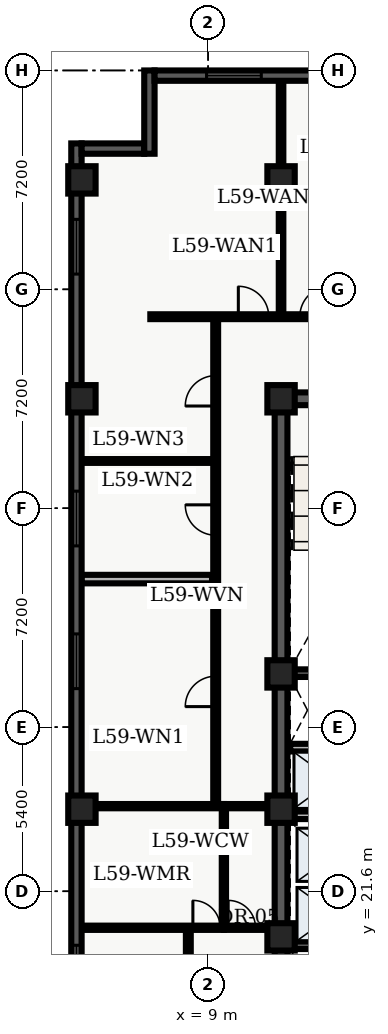
"""IFC4 building model, lengths in metres.
Left out: names, types, materials, properties, quantities, classifications, styles, units other than length and angle.
Written with IfcOpenShell. Run it as: python <this file> out.ifc"""

import sys

from ifc_helpers import new_model, entity, si_unit, converted_unit, direction, frame, origin_with_axes, origin_2d_with_axis, place, context, subcontext, project, spatial, polyline, rectangle, outline, extrude, element, fill, save


model = new_model("IFC4")
c1 = context("Model", 3, precision=1e-05, world=origin_with_axes(), true_north=direction((0.0, 1.0)))
c2 = subcontext(c1, "Body", "Model", "MODEL_VIEW")
j1 = project(units=[si_unit("LENGTHUNIT", "METRE"), converted_unit("PLANEANGLEUNIT", "DEGREE", entity("IfcPlaneAngleMeasure", 0.017), si_unit("PLANEANGLEUNIT", "RADIAN"), dimensions=[0, 0, 0, 0, 0, 0, 0])], contexts=[c1])
p1 = place(None, origin_with_axes())
s1 = spatial("IfcSite", under=j1, at=p1, CompositionType="ELEMENT")
p2 = place(p1, origin_with_axes())
s2 = spatial("IfcBuilding", under=s1, at=p2, CompositionType="ELEMENT")
p3 = place(p2, frame((0.0, 0.0, 240.3), z_axis=(0.0, 0.0, 1.0), x_axis=(1.0, 0.0, 0.0)))
s3 = spatial("IfcBuildingStorey", under=s2, at=p3, CompositionType="ELEMENT", Elevation=240.3)
p4 = place(p3, frame((11.4, 10.8, 0.0), z_axis=(0.0, 0.0, 1.0), x_axis=(0.0, 1.0, 0.0)))
e1 = element("IfcWall", 1, at=p4, inside=s3, PredefinedType="SHEAR", context=c2, shape_type="SweptSolid", body=[
    extrude(outline(polyline([(0.0, -0.21), (27.0, -0.21), (27.0, 0.21), (0.0, 0.21), (0.0, -0.21)])), origin_with_axes(), (0.0, 0.0, 1.0), 3.66),
])
p5 = place(p3, frame((11.4, 37.8, 0.0), z_axis=(0.0, 0.0, 1.0), x_axis=(1.0, 0.0, 0.0)))
e2 = element("IfcWall", 2, at=p5, inside=s3, PredefinedType="SHEAR", context=c2, shape_type="SweptSolid", body=[
    extrude(outline(polyline([(0.0, -0.21), (7.2, -0.21), (7.2, 0.21), (0.0, 0.21), (0.0, -0.21)])), origin_with_axes(), (0.0, 0.0, 1.0), 3.66),
])
p6 = place(p5, frame((2.625, 0.0, 0.0), z_axis=(0.0, 0.0, 1.0), x_axis=(1.0, 0.0, 0.0)))
e3 = element("IfcOpeningElement", 3, at=p6, cuts=e2, PredefinedType="OPENING", context=c2, shape_type="SweptSolid", body=[
    extrude(rectangle(XDim=1.05, YDim=0.44, at=origin_2d_with_axis()), origin_with_axes(), (0.0, 0.0, 1.0), 2.15),
])
for number, where, z_axis, x_axis in (
    (4, (11.61, 19.825, 0.0), (0.0, 0.0, 1.0), (1.0, 0.0, 0.0)),
    (5, (11.61, 28.775, 0.0), (0.0, 0.0, 1.0), (1.0, 0.0, 0.0)),
):
    element("IfcWall", number, at=place(p3, frame(where, z_axis=z_axis, x_axis=x_axis)), inside=s3, PredefinedType="SHEAR", context=c2, shape_type="SweptSolid", body=[
        extrude(outline(polyline([(0.0, -0.125), (6.78, -0.125), (6.78, 0.125), (0.0, 0.125), (0.0, -0.125)])), origin_with_axes(), (0.0, 0.0, 1.0), 3.66),
    ])
p7 = place(p3, frame((11.7, 24.1, 0.0), z_axis=(0.0, 0.0, 1.0), x_axis=(1.0, 0.0, 0.0)))
e6 = element("IfcWall", 6, at=p7, inside=s3, PredefinedType="SOLIDWALL", context=c2, shape_type="SweptSolid", body=[
    extrude(outline(polyline([(0.0, -0.125), (6.6, -0.125), (6.6, 0.125), (0.0, 0.125), (0.0, -0.125)])), origin_with_axes(), (0.0, 0.0, 1.0), 2.7),
])
p8 = place(p7, frame((3.6, 0.0, 0.0), z_axis=(0.0, 0.0, 1.0), x_axis=(1.0, 0.0, 0.0)))
e7 = element("IfcOpeningElement", 7, at=p8, cuts=e6, PredefinedType="OPENING", context=c2, shape_type="SweptSolid", body=[
    extrude(rectangle(XDim=0.9, YDim=0.27, at=origin_2d_with_axis()), origin_with_axes(), (0.0, 0.0, 1.0), 2.15),
])
p9 = place(p7, frame((5.65, 0.0, 0.0), z_axis=(0.0, 0.0, 1.0), x_axis=(1.0, 0.0, 0.0)))
e8 = element("IfcOpeningElement", 8, at=p9, cuts=e6, PredefinedType="OPENING", context=c2, shape_type="SweptSolid", body=[
    extrude(rectangle(XDim=0.9, YDim=0.27, at=origin_2d_with_axis()), origin_with_axes(), (0.0, 0.0, 1.0), 2.15),
])
p10 = place(p3, frame((11.7, 26.325, 0.0), z_axis=(0.0, 0.0, 1.0), x_axis=(1.0, 0.0, 0.0)))
e9 = element("IfcWall", 9, at=p10, inside=s3, PredefinedType="SOLIDWALL", context=c2, shape_type="SweptSolid", body=[
    extrude(outline(polyline([(0.0, -0.125), (6.6, -0.125), (6.6, 0.125), (0.0, 0.125), (0.0, -0.125)])), origin_with_axes(), (0.0, 0.0, 1.0), 2.7),
])
p11 = place(p10, frame((3.5, 0.0, 0.0), z_axis=(0.0, 0.0, 1.0), x_axis=(1.0, 0.0, 0.0)))
e10 = element("IfcOpeningElement", 10, at=p11, cuts=e9, PredefinedType="OPENING", context=c2, shape_type="SweptSolid", body=[
    extrude(rectangle(XDim=0.9, YDim=0.27, at=origin_2d_with_axis()), origin_with_axes(), (0.0, 0.0, 1.0), 2.15),
])
for number, where, z_axis, x_axis in (
    (11, (11.4, 20.1, 0.0), (0.0, 0.0, 1.0), (1.0, 0.0, 0.0)),
    (12, (11.4, 24.3, 0.0), (0.0, 0.0, 1.0), (1.0, 0.0, 0.0)),
    (13, (11.4, 28.75, 0.0), (0.0, 0.0, 1.0), (1.0, 0.0, 0.0)),
    (14, (11.4, 37.8, 0.0), (0.0, 0.0, 1.0), (1.0, 0.0, 0.0)),
    (15, (11.4, 45.0, 0.0), (0.0, 0.0, 1.0), (1.0, 0.0, 0.0)),
    (16, (4.85, 24.3, 0.0), (0.0, 0.0, 1.0), (1.0, 0.0, 0.0)),
    (17, (4.85, 37.8, 0.0), (0.0, 0.0, 1.0), (1.0, 0.0, 0.0)),
    (18, (4.85, 45.0, 0.0), (0.0, 0.0, 1.0), (1.0, 0.0, 0.0)),
):
    element("IfcColumn", number, at=place(p3, frame(where, z_axis=z_axis, x_axis=x_axis)), inside=s3, PredefinedType="COLUMN", context=c2, shape_type="SweptSolid", body=[
        extrude(rectangle(XDim=0.9, YDim=0.9, at=origin_2d_with_axis()), origin_with_axes(), (0.0, 0.0, 1.0), 3.9),
    ])
p12 = place(p3, frame((9.52, 20.4, 0.0), z_axis=(0.0, 0.0, 1.0), x_axis=(0.0, 1.0, 0.0)))
e19 = element("IfcWall", 19, at=p12, inside=s3, PredefinedType="PARTITIONING", context=c2, shape_type="SweptSolid", body=[
    extrude(outline(polyline([(0.0, -0.07), (4.0, -0.07), (4.0, 0.07), (0.0, 0.07), (0.0, -0.07)])), origin_with_axes(), (0.0, 0.0, 1.0), 2.7),
])
p13 = place(p3, frame((9.52, 20.4, 0.0), z_axis=(0.0, 0.0, 1.0), x_axis=(1.0, 0.0, 0.0)))
e20 = element("IfcWall", 20, at=p13, inside=s3, PredefinedType="PARTITIONING", context=c2, shape_type="SweptSolid", body=[
    extrude(outline(polyline([(0.0, -0.07), (1.58, -0.07), (1.58, 0.07), (0.0, 0.07), (0.0, -0.07)])), origin_with_axes(), (0.0, 0.0, 1.0), 2.7),
])
p14 = place(p13, frame((0.59, 0.0, 0.0), z_axis=(0.0, 0.0, 1.0), x_axis=(1.0, 0.0, 0.0)))
e21 = element("IfcOpeningElement", 21, at=p14, cuts=e20, PredefinedType="OPENING", context=c2, shape_type="SweptSolid", body=[
    extrude(rectangle(XDim=0.9, YDim=0.16, at=origin_2d_with_axis()), origin_with_axes(), (0.0, 0.0, 1.0), 2.15),
])
p15 = place(p3, frame((9.52, 24.4, 0.0), z_axis=(0.0, 0.0, 1.0), x_axis=(1.0, 0.0, 0.0)))
e22 = element("IfcWall", 22, at=p15, inside=s3, PredefinedType="PARTITIONING", context=c2, shape_type="SweptSolid", body=[
    extrude(outline(polyline([(0.0, -0.07), (1.58, -0.07), (1.58, 0.07), (0.0, 0.07), (0.0, -0.07)])), origin_with_axes(), (0.0, 0.0, 1.0), 2.7),
])
p16 = place(p3, frame((7.1, 40.5, 0.0), z_axis=(0.0, 0.0, 1.0), x_axis=(1.0, 0.0, 0.0)))
e23 = element("IfcWall", 23, at=p16, inside=s3, PredefinedType="PARTITIONING", context=c2, shape_type="SweptSolid", body=[
    extrude(outline(polyline([(0.0, -0.08), (24.965, -0.08), (24.965, 0.08), (0.0, 0.08), (0.0, -0.08)])), origin_with_axes(), (0.0, 0.0, 1.0), 2.7),
])
p17 = place(p16, frame((3.395, 0.0, 0.0), z_axis=(0.0, 0.0, 1.0), x_axis=(1.0, 0.0, 0.0)))
e24 = element("IfcOpeningElement", 24, at=p17, cuts=e23, PredefinedType="OPENING", context=c2, shape_type="SweptSolid", body=[
    extrude(rectangle(XDim=1.0, YDim=0.18, at=origin_2d_with_axis()), origin_with_axes(), (0.0, 0.0, 1.0), 2.15),
])
p18 = place(p16, frame((5.418, 0.0, 0.0), z_axis=(0.0, 0.0, 1.0), x_axis=(1.0, 0.0, 0.0)))
e25 = element("IfcOpeningElement", 25, at=p18, cuts=e23, PredefinedType="OPENING", context=c2, shape_type="SweptSolid", body=[
    extrude(rectangle(XDim=1.0, YDim=0.18, at=origin_2d_with_axis()), origin_with_axes(), (0.0, 0.0, 1.0), 2.15),
])
p19 = place(p16, frame((8.386, 0.0, 0.0), z_axis=(0.0, 0.0, 1.0), x_axis=(1.0, 0.0, 0.0)))
e26 = element("IfcOpeningElement", 26, at=p19, cuts=e23, PredefinedType="OPENING", context=c2, shape_type="SweptSolid", body=[
    extrude(rectangle(XDim=1.0, YDim=0.18, at=origin_2d_with_axis()), origin_with_axes(), (0.0, 0.0, 1.0), 2.15),
])
p20 = place(p16, frame((11.068, 0.0, 0.0), z_axis=(0.0, 0.0, 1.0), x_axis=(1.0, 0.0, 0.0)))
e27 = element("IfcOpeningElement", 27, at=p20, cuts=e23, PredefinedType="OPENING", context=c2, shape_type="SweptSolid", body=[
    extrude(rectangle(XDim=1.0, YDim=0.18, at=origin_2d_with_axis()), origin_with_axes(), (0.0, 0.0, 1.0), 2.15),
])
p21 = place(p3, frame((8.35, 7.8, 0.0), z_axis=(0.0, 0.0, 1.0), x_axis=(0.0, 1.0, 0.0)))
e28 = element("IfcWall", 28, at=p21, inside=s3, PredefinedType="PARTITIONING", context=c2, shape_type="SweptSolid", body=[
    extrude(outline(polyline([(0.0, -0.08), (12.6, -0.08), (12.6, 0.08), (0.0, 0.08), (0.0, -0.08)])), origin_with_axes(), (0.0, 0.0, 1.0), 2.7),
])
p22 = place(p21, frame((2.932, 0.0, 0.0), z_axis=(0.0, 0.0, 1.0), x_axis=(1.0, 0.0, 0.0)))
e29 = element("IfcOpeningElement", 29, at=p22, cuts=e28, PredefinedType="OPENING", context=c2, shape_type="SweptSolid", body=[
    extrude(rectangle(XDim=1.0, YDim=0.18, at=origin_2d_with_axis()), origin_with_axes(), (0.0, 0.0, 1.0), 2.15),
])
p23 = place(p21, frame((9.127, 0.0, 0.0), z_axis=(0.0, 0.0, 1.0), x_axis=(1.0, 0.0, 0.0)))
e30 = element("IfcOpeningElement", 30, at=p23, cuts=e28, PredefinedType="OPENING", context=c2, shape_type="SweptSolid", body=[
    extrude(rectangle(XDim=1.0, YDim=0.18, at=origin_2d_with_axis()), origin_with_axes(), (0.0, 0.0, 1.0), 2.15),
])
p24 = place(p3, frame((9.25, 24.4, 0.0), z_axis=(0.0, 0.0, 1.0), x_axis=(0.0, 1.0, 0.0)))
e31 = element("IfcWall", 31, at=p24, inside=s3, PredefinedType="PARTITIONING", context=c2, shape_type="SweptSolid", body=[
    extrude(outline(polyline([(0.0, -0.08), (16.1, -0.08), (16.1, 0.08), (0.0, 0.08), (0.0, -0.08)])), origin_with_axes(), (0.0, 0.0, 1.0), 2.7),
])
p25 = place(p24, frame((3.775, 0.0, 0.0), z_axis=(0.0, 0.0, 1.0), x_axis=(1.0, 0.0, 0.0)))
e32 = element("IfcOpeningElement", 32, at=p25, cuts=e31, PredefinedType="OPENING", context=c2, shape_type="SweptSolid", body=[
    extrude(rectangle(XDim=1.0, YDim=0.18, at=origin_2d_with_axis()), origin_with_axes(), (0.0, 0.0, 1.0), 2.15),
])
p26 = place(p24, frame((9.412, 0.0, 0.0), z_axis=(0.0, 0.0, 1.0), x_axis=(1.0, 0.0, 0.0)))
e33 = element("IfcOpeningElement", 33, at=p26, cuts=e31, PredefinedType="OPENING", context=c2, shape_type="SweptSolid", body=[
    extrude(rectangle(XDim=1.0, YDim=0.18, at=origin_2d_with_axis()), origin_with_axes(), (0.0, 0.0, 1.0), 2.15),
])
p27 = place(p24, frame((13.662, 0.0, 0.0), z_axis=(0.0, 0.0, 1.0), x_axis=(1.0, 0.0, 0.0)))
e34 = element("IfcOpeningElement", 34, at=p27, cuts=e31, PredefinedType="OPENING", context=c2, shape_type="SweptSolid", body=[
    extrude(rectangle(XDim=1.0, YDim=0.18, at=origin_2d_with_axis()), origin_with_axes(), (0.0, 0.0, 1.0), 2.15),
])
p28 = place(p3, frame((4.835, 20.4, 0.0), z_axis=(0.0, 0.0, 1.0), x_axis=(1.0, 0.0, 0.0)))
e35 = element("IfcWall", 35, at=p28, inside=s3, PredefinedType="PARTITIONING", context=c2, shape_type="SweptSolid", body=[
    extrude(outline(polyline([(0.0, -0.07), (4.685, -0.07), (4.685, 0.07), (0.0, 0.07), (0.0, -0.07)])), origin_with_axes(), (0.0, 0.0, 1.0), 2.7),
])
p29 = place(p28, frame((4.115, 0.0, 0.0), z_axis=(0.0, 0.0, 1.0), x_axis=(1.0, 0.0, 0.0)))
e36 = element("IfcOpeningElement", 36, at=p29, cuts=e35, PredefinedType="OPENING", context=c2, shape_type="SweptSolid", body=[
    extrude(rectangle(XDim=0.9, YDim=0.16, at=origin_2d_with_axis()), origin_with_axes(), (0.0, 0.0, 1.0), 2.15),
])
p30 = place(p3, frame((4.835, 24.4, 0.0), z_axis=(0.0, 0.0, 1.0), x_axis=(1.0, 0.0, 0.0)))
e37 = element("IfcWall", 37, at=p30, inside=s3, PredefinedType="PARTITIONING", context=c2, shape_type="SweptSolid", body=[
    extrude(outline(polyline([(0.0, -0.07), (4.685, -0.07), (4.685, 0.07), (0.0, 0.07), (0.0, -0.07)])), origin_with_axes(), (0.0, 0.0, 1.0), 2.7),
])
p31 = place(p3, frame((4.835, 31.869, 0.0), z_axis=(0.0, 0.0, 1.0), x_axis=(1.0, 0.0, 0.0)))
e38 = element("IfcWall", 38, at=p31, inside=s3, PredefinedType="PARTITIONING", context=c2, shape_type="SweptSolid", body=[
    extrude(outline(polyline([(0.0, -0.14), (4.295, -0.14), (4.295, 0.14), (0.0, 0.14), (0.0, -0.14)])), origin_with_axes(), (0.0, 0.0, 1.0), 2.7),
])
p32 = place(p3, frame((4.835, 35.754, 0.0), z_axis=(0.0, 0.0, 1.0), x_axis=(1.0, 0.0, 0.0)))
e39 = element("IfcWall", 39, at=p32, inside=s3, PredefinedType="PARTITIONING", context=c2, shape_type="SweptSolid", body=[
    extrude(outline(polyline([(0.0, -0.062), (4.295, -0.062), (4.295, 0.062), (0.0, 0.062), (0.0, -0.062)])), origin_with_axes(), (0.0, 0.0, 1.0), 2.7),
])
p33 = place(p3, frame((11.4, 40.6, 0.0), z_axis=(0.0, 0.0, 1.0), x_axis=(0.0, 1.0, 0.0)))
e40 = element("IfcWall", 40, at=p33, inside=s3, PredefinedType="PARTITIONING", context=c2, shape_type="SweptSolid", body=[
    extrude(outline(polyline([(0.0, -0.075), (7.665, -0.075), (7.665, 0.075), (0.0, 0.075), (0.0, -0.075)])), origin_with_axes(), (0.0, 0.0, 1.0), 2.7),
])
p34 = place(p3, frame((4.67, 2.74, 0.0), z_axis=(0.0, 0.0, 1.0), x_axis=(0.0, 1.0, 0.0)))
e41 = element("IfcWall", 41, at=p34, inside=s3, PredefinedType="SOLIDWALL", context=c2, shape_type="SweptSolid", body=[
    extrude(outline(polyline([(0.0, -0.17), (43.46, -0.17), (43.46, 0.17), (0.0, 0.17), (0.0, -0.17)])), origin_with_axes(), (0.0, 0.0, 1.0), 3.66),
])
p35 = place(p34, frame((2.948, 0.0, 0.45), z_axis=(0.0, 0.0, 1.0), x_axis=(1.0, 0.0, 0.0)))
e42 = element("IfcOpeningElement", 42, at=p35, cuts=e41, PredefinedType="OPENING", context=c2, shape_type="SweptSolid", body=[
    extrude(rectangle(XDim=1.8, YDim=0.36, at=origin_2d_with_axis()), origin_with_axes(), (0.0, 0.0, 1.0), 2.1),
])
p36 = place(p34, frame((12.339, 0.0, 0.45), z_axis=(0.0, 0.0, 1.0), x_axis=(1.0, 0.0, 0.0)))
e43 = element("IfcOpeningElement", 43, at=p36, cuts=e41, PredefinedType="OPENING", context=c2, shape_type="SweptSolid", body=[
    extrude(rectangle(XDim=1.8, YDim=0.36, at=origin_2d_with_axis()), origin_with_axes(), (0.0, 0.0, 1.0), 2.1),
])
p37 = place(p34, frame((16.184, 0.0, 0.45), z_axis=(0.0, 0.0, 1.0), x_axis=(1.0, 0.0, 0.0)))
e44 = element("IfcOpeningElement", 44, at=p37, cuts=e41, PredefinedType="OPENING", context=c2, shape_type="SweptSolid", body=[
    extrude(rectangle(XDim=1.8, YDim=0.36, at=origin_2d_with_axis()), origin_with_axes(), (0.0, 0.0, 1.0), 2.1),
])
p38 = place(p34, frame((26.426, 0.0, 0.45), z_axis=(0.0, 0.0, 1.0), x_axis=(1.0, 0.0, 0.0)))
e45 = element("IfcOpeningElement", 45, at=p38, cuts=e41, PredefinedType="OPENING", context=c2, shape_type="SweptSolid", body=[
    extrude(rectangle(XDim=1.8, YDim=0.36, at=origin_2d_with_axis()), origin_with_axes(), (0.0, 0.0, 1.0), 2.1),
])
p39 = place(p34, frame((31.121, 0.0, 0.45), z_axis=(0.0, 0.0, 1.0), x_axis=(1.0, 0.0, 0.0)))
e46 = element("IfcOpeningElement", 46, at=p39, cuts=e41, PredefinedType="OPENING", context=c2, shape_type="SweptSolid", body=[
    extrude(rectangle(XDim=1.8, YDim=0.36, at=origin_2d_with_axis()), origin_with_axes(), (0.0, 0.0, 1.0), 2.1),
])
p40 = place(p34, frame((40.062, 0.0, 0.45), z_axis=(0.0, 0.0, 1.0), x_axis=(1.0, 0.0, 0.0)))
e47 = element("IfcOpeningElement", 47, at=p40, cuts=e41, PredefinedType="OPENING", context=c2, shape_type="SweptSolid", body=[
    extrude(rectangle(XDim=1.8, YDim=0.36, at=origin_2d_with_axis()), origin_with_axes(), (0.0, 0.0, 1.0), 2.1),
])
p41 = place(p3, frame((4.84, 46.03, 0.0), z_axis=(0.0, 0.0, 1.0), x_axis=(1.0, 0.0, 0.0)))
e48 = element("IfcWall", 48, at=p41, inside=s3, PredefinedType="SOLIDWALL", context=c2, shape_type="SweptSolid", body=[
    extrude(outline(polyline([(0.0, -0.17), (2.06, -0.17), (2.06, 0.17), (0.0, 0.17), (0.0, -0.17)])), origin_with_axes(), (0.0, 0.0, 1.0), 3.66),
])
p42 = place(p3, frame((7.07, 45.86, 0.0), z_axis=(0.0, 0.0, 1.0), x_axis=(0.0, 1.0, 0.0)))
e49 = element("IfcWall", 49, at=p42, inside=s3, PredefinedType="SOLIDWALL", context=c2, shape_type="SweptSolid", body=[
    extrude(outline(polyline([(0.0, -0.17), (2.74, -0.17), (2.74, 0.17), (0.0, 0.17), (0.0, -0.17)])), origin_with_axes(), (0.0, 0.0, 1.0), 3.66),
])
p43 = place(p3, frame((7.24, 48.43, 0.0), z_axis=(0.0, 0.0, 1.0), x_axis=(1.0, 0.0, 0.0)))
e50 = element("IfcWall", 50, at=p43, inside=s3, PredefinedType="SOLIDWALL", context=c2, shape_type="SweptSolid", body=[
    extrude(outline(polyline([(0.0, -0.17), (18.36, -0.17), (18.36, 0.17), (0.0, 0.17), (0.0, -0.17)])), origin_with_axes(), (0.0, 0.0, 1.0), 3.66),
])
p44 = place(p43, frame((2.61, 0.0, 0.45), z_axis=(0.0, 0.0, 1.0), x_axis=(1.0, 0.0, 0.0)))
e51 = element("IfcOpeningElement", 51, at=p44, cuts=e50, PredefinedType="OPENING", context=c2, shape_type="SweptSolid", body=[
    extrude(rectangle(XDim=1.8, YDim=0.36, at=origin_2d_with_axis()), origin_with_axes(), (0.0, 0.0, 1.0), 2.1),
])
p45 = place(p43, frame((8.33, 0.0, 0.45), z_axis=(0.0, 0.0, 1.0), x_axis=(1.0, 0.0, 0.0)))
e52 = element("IfcOpeningElement", 52, at=p45, cuts=e50, PredefinedType="OPENING", context=c2, shape_type="SweptSolid", body=[
    extrude(rectangle(XDim=1.8, YDim=0.36, at=origin_2d_with_axis()), origin_with_axes(), (0.0, 0.0, 1.0), 2.1),
])
p46 = place(p43, frame((14.9, 0.0, 0.45), z_axis=(0.0, 0.0, 1.0), x_axis=(1.0, 0.0, 0.0)))
e53 = element("IfcOpeningElement", 53, at=p46, cuts=e50, PredefinedType="OPENING", context=c2, shape_type="SweptSolid", body=[
    extrude(rectangle(XDim=1.8, YDim=0.36, at=origin_2d_with_axis()), origin_with_axes(), (0.0, 0.0, 1.0), 2.1),
])
p47 = place(p13, frame((0.59, 0.0, 0.0), z_axis=(0.0, 0.0, 1.0), x_axis=(1.0, 0.0, 0.0)))
e54 = element("IfcDoor", 54, at=p47, inside=s3, OperationType="SINGLE_SWING_LEFT", PredefinedType="DOOR", context=c2, shape_type="SweptSolid", body=[
    extrude(rectangle(XDim=0.9, YDim=0.084, at=origin_2d_with_axis()), origin_with_axes(), (0.0, 0.0, 1.0), 2.15),
])
fill(e21, e54)
p48 = place(p28, frame((4.115, 0.0, 0.0), z_axis=(0.0, 0.0, 1.0), x_axis=(1.0, 0.0, 0.0)))
e55 = element("IfcDoor", 55, at=p48, inside=s3, OperationType="SINGLE_SWING_LEFT", PredefinedType="DOOR", context=c2, shape_type="SweptSolid", body=[
    extrude(rectangle(XDim=0.9, YDim=0.084, at=origin_2d_with_axis()), origin_with_axes(), (0.0, 0.0, 1.0), 2.15),
])
fill(e36, e55)
p49 = place(p24, frame((3.775, 0.0, 0.0), z_axis=(0.0, 0.0, 1.0), x_axis=(1.0, 0.0, 0.0)))
e56 = element("IfcDoor", 56, at=p49, inside=s3, OperationType="SINGLE_SWING_LEFT", PredefinedType="DOOR", context=c2, shape_type="SweptSolid", body=[
    extrude(rectangle(XDim=1.0, YDim=0.09, at=origin_2d_with_axis()), origin_with_axes(), (0.0, 0.0, 1.0), 2.15),
])
fill(e32, e56)
p50 = place(p24, frame((9.412, 0.0, 0.0), z_axis=(0.0, 0.0, 1.0), x_axis=(1.0, 0.0, 0.0)))
e57 = element("IfcDoor", 57, at=p50, inside=s3, OperationType="SINGLE_SWING_RIGHT", PredefinedType="DOOR", context=c2, shape_type="SweptSolid", body=[
    extrude(rectangle(XDim=1.0, YDim=0.09, at=origin_2d_with_axis()), origin_with_axes(), (0.0, 0.0, 1.0), 2.15),
])
fill(e33, e57)
p51 = place(p24, frame((13.662, 0.0, 0.0), z_axis=(0.0, 0.0, 1.0), x_axis=(1.0, 0.0, 0.0)))
e58 = element("IfcDoor", 58, at=p51, inside=s3, OperationType="SINGLE_SWING_LEFT", PredefinedType="DOOR", context=c2, shape_type="SweptSolid", body=[
    extrude(rectangle(XDim=1.0, YDim=0.09, at=origin_2d_with_axis()), origin_with_axes(), (0.0, 0.0, 1.0), 2.15),
])
fill(e34, e58)
p52 = place(p16, frame((3.395, 0.0, 0.0), z_axis=(0.0, 0.0, 1.0), x_axis=(1.0, 0.0, 0.0)))
e59 = element("IfcDoor", 59, at=p52, inside=s3, OperationType="SINGLE_SWING_LEFT", PredefinedType="DOOR", context=c2, shape_type="SweptSolid", body=[
    extrude(rectangle(XDim=1.0, YDim=0.09, at=origin_2d_with_axis()), origin_with_axes(), (0.0, 0.0, 1.0), 2.15),
])
fill(e24, e59)
p53 = place(p16, frame((5.418, 0.0, 0.0), z_axis=(0.0, 0.0, 1.0), x_axis=(1.0, 0.0, 0.0)))
e60 = element("IfcDoor", 60, at=p53, inside=s3, OperationType="SINGLE_SWING_RIGHT", PredefinedType="DOOR", context=c2, shape_type="SweptSolid", body=[
    extrude(rectangle(XDim=1.0, YDim=0.09, at=origin_2d_with_axis()), origin_with_axes(), (0.0, 0.0, 1.0), 2.15),
])
fill(e25, e60)
p54 = place(p34, frame((16.184, 0.0, 0.45), z_axis=(0.0, 0.0, 1.0), x_axis=(1.0, 0.0, 0.0)))
e61 = element("IfcWindow", 61, at=p54, inside=s3, PredefinedType="WINDOW", context=c2, shape_type="SweptSolid", body=[
    extrude(rectangle(XDim=1.8, YDim=0.09, at=origin_2d_with_axis()), origin_with_axes(), (0.0, 0.0, 1.0), 2.1),
])
fill(e44, e61)
p55 = place(p34, frame((26.426, 0.0, 0.45), z_axis=(0.0, 0.0, 1.0), x_axis=(1.0, 0.0, 0.0)))
e62 = element("IfcWindow", 62, at=p55, inside=s3, PredefinedType="WINDOW", context=c2, shape_type="SweptSolid", body=[
    extrude(rectangle(XDim=1.8, YDim=0.09, at=origin_2d_with_axis()), origin_with_axes(), (0.0, 0.0, 1.0), 2.1),
])
fill(e45, e62)
p56 = place(p34, frame((31.121, 0.0, 0.45), z_axis=(0.0, 0.0, 1.0), x_axis=(1.0, 0.0, 0.0)))
e63 = element("IfcWindow", 63, at=p56, inside=s3, PredefinedType="WINDOW", context=c2, shape_type="SweptSolid", body=[
    extrude(rectangle(XDim=1.8, YDim=0.09, at=origin_2d_with_axis()), origin_with_axes(), (0.0, 0.0, 1.0), 2.1),
])
fill(e46, e63)
p57 = place(p34, frame((40.062, 0.0, 0.45), z_axis=(0.0, 0.0, 1.0), x_axis=(1.0, 0.0, 0.0)))
e64 = element("IfcWindow", 64, at=p57, inside=s3, PredefinedType="WINDOW", context=c2, shape_type="SweptSolid", body=[
    extrude(rectangle(XDim=1.8, YDim=0.09, at=origin_2d_with_axis()), origin_with_axes(), (0.0, 0.0, 1.0), 2.1),
])
fill(e47, e64)
p58 = place(p43, frame((2.61, 0.0, 0.45), z_axis=(0.0, 0.0, 1.0), x_axis=(1.0, 0.0, 0.0)))
e65 = element("IfcWindow", 65, at=p58, inside=s3, PredefinedType="WINDOW", context=c2, shape_type="SweptSolid", body=[
    extrude(rectangle(XDim=1.8, YDim=0.09, at=origin_2d_with_axis()), origin_with_axes(), (0.0, 0.0, 1.0), 2.1),
])
fill(e51, e65)
save(model, sys.argv[1])
